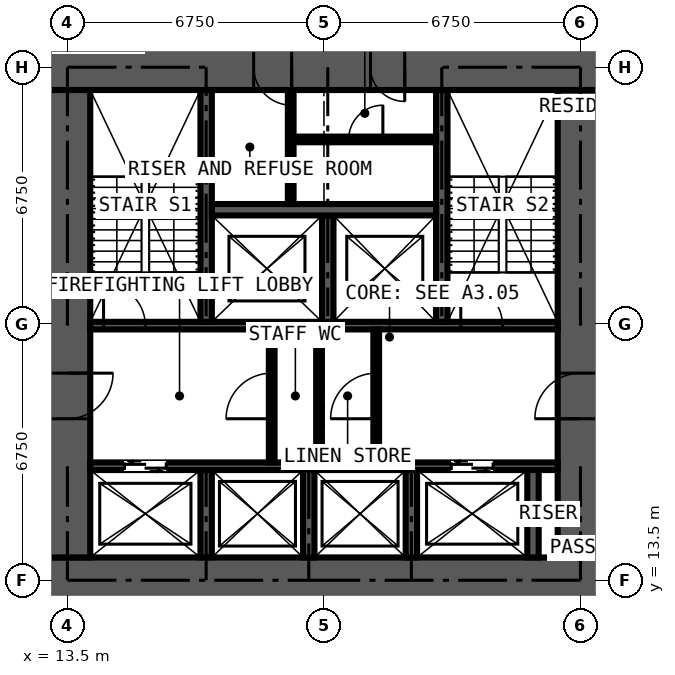
"""IFC4 building model, lengths in metres.
Left out: names, types, materials, properties, quantities, classifications, styles, units other than length and angle.
Written with IfcOpenShell. Run it as: python <this file> out.ifc"""

import sys

from ifc_helpers import new_model, si_unit, direction, frame, frame_2d, origin, place, context, subcontext, project, spatial, rectangle, extrude, element, fill, save


model = new_model("IFC4")
c1 = context("Model", 3, precision=1e-05, world=origin(), true_north=direction((0.0, 1.0)))
c2 = subcontext(c1, "Body", "Model", "MODEL_VIEW")
j1 = project(units=[si_unit("LENGTHUNIT", "METRE"), si_unit("PLANEANGLEUNIT", "RADIAN")], contexts=[c1])
p1 = place(None, origin())
s1 = spatial("IfcSite", under=j1, at=p1, CompositionType="ELEMENT")
p2 = place(p1, origin())
s2 = spatial("IfcBuilding", under=s1, at=p2, CompositionType="ELEMENT")
p3 = place(p2, frame((0.0, 0.0, 134.1)))
s3 = spatial("IfcBuildingStorey", under=s2, at=p3, CompositionType="ELEMENT", Elevation=134.1)
p4 = place(p3, frame((12.9, 13.5, 0.0), z_axis=(0.0, 0.0, 1.0), x_axis=(1.0, 0.0, 0.0)))
e1 = element("IfcWall", 1, at=p4, inside=s3, PredefinedType="SHEAR", context=c2, shape_type="SweptSolid", body=[
    extrude(rectangle(XDim=14.7, YDim=1.2, at=frame_2d((7.35, 0.0))), origin(), (0.0, 0.0, 1.0), 3.6),
])
p5 = place(p3, frame((27.0, 14.1, 0.0), z_axis=(0.0, 0.0, 1.0), x_axis=(0.0, 1.0, 0.0)))
e2 = element("IfcWall", 2, at=p5, inside=s3, PredefinedType="SHEAR", context=c2, shape_type="SweptSolid", body=[
    extrude(rectangle(XDim=12.3, YDim=1.2, at=frame_2d((6.15, 0.0))), origin(), (0.0, 0.0, 1.0), 3.6),
])
p6 = place(p5, frame((3.65, 0.0, 0.0)))
e3 = element("IfcOpeningElement", 3, at=p6, cuts=e2, PredefinedType="OPENING", context=c2, shape_type="SweptSolid", body=[
    extrude(rectangle(XDim=1.2, YDim=2.2, at=frame_2d((0.6, 1.1))), frame((0.0, 0.61, 0.0), z_axis=(0.0, -1.0, 0.0), x_axis=(1.0, 0.0, 0.0)), (0.0, 0.0, 1.0), 1.22),
])
p7 = place(p3, frame((27.6, 27.0, 0.0), z_axis=(0.0, 0.0, 1.0), x_axis=(-1.0, 0.0, 0.0)))
e4 = element("IfcWall", 4, at=p7, inside=s3, PredefinedType="SHEAR", context=c2, shape_type="SweptSolid", body=[
    extrude(rectangle(XDim=14.7, YDim=1.2, at=frame_2d((7.35, 0.0))), origin(), (0.0, 0.0, 1.0), 3.6),
])
p8 = place(p7, frame((5.225, 0.0, 0.0)))
e5 = element("IfcOpeningElement", 5, at=p8, cuts=e4, PredefinedType="OPENING", context=c2, shape_type="SweptSolid", body=[
    extrude(rectangle(XDim=0.9, YDim=2.2, at=frame_2d((0.45, 1.1))), frame((0.0, 0.61, 0.0), z_axis=(0.0, -1.0, 0.0), x_axis=(1.0, 0.0, 0.0)), (0.0, 0.0, 1.0), 1.22),
])
p9 = place(p7, frame((8.2, 0.0, 0.0)))
e6 = element("IfcOpeningElement", 6, at=p9, cuts=e4, PredefinedType="OPENING", context=c2, shape_type="SweptSolid", body=[
    extrude(rectangle(XDim=1.0, YDim=2.2, at=frame_2d((0.5, 1.1))), frame((0.0, 0.61, 0.0), z_axis=(0.0, -1.0, 0.0), x_axis=(1.0, 0.0, 0.0)), (0.0, 0.0, 1.0), 1.22),
])
p10 = place(p3, frame((13.5, 26.4, 0.0), z_axis=(0.0, 0.0, 1.0), x_axis=(0.0, -1.0, 0.0)))
e7 = element("IfcWall", 7, at=p10, inside=s3, PredefinedType="SHEAR", context=c2, shape_type="SweptSolid", body=[
    extrude(rectangle(XDim=12.3, YDim=1.2, at=frame_2d((6.15, 0.0))), origin(), (0.0, 0.0, 1.0), 3.6),
])
p11 = place(p10, frame((7.45, 0.0, 0.0)))
e8 = element("IfcOpeningElement", 8, at=p11, cuts=e7, PredefinedType="OPENING", context=c2, shape_type="SweptSolid", body=[
    extrude(rectangle(XDim=1.2, YDim=2.2, at=frame_2d((0.6, 1.1))), frame((0.0, 0.61, 0.0), z_axis=(0.0, -1.0, 0.0), x_axis=(1.0, 0.0, 0.0)), (0.0, 0.0, 1.0), 1.22),
])
p12 = place(p3, frame((14.1, 16.5, 0.0), z_axis=(0.0, 0.0, 1.0), x_axis=(1.0, 0.0, 0.0)))
e9 = element("IfcWall", 9, at=p12, inside=s3, PredefinedType="SHEAR", context=c2, shape_type="SweptSolid", body=[
    extrude(rectangle(XDim=12.3, YDim=0.2, at=frame_2d((6.15, 0.0))), origin(), (0.0, 0.0, 1.0), 3.6),
])
p13 = place(p12, frame((0.9, 0.0, 0.0)))
e10 = element("IfcOpeningElement", 10, at=p13, cuts=e9, PredefinedType="OPENING", context=c2, shape_type="SweptSolid", body=[
    extrude(rectangle(XDim=1.1, YDim=2.2, at=frame_2d((0.55, 1.1))), frame((0.0, 0.11, 0.0), z_axis=(0.0, -1.0, 0.0), x_axis=(1.0, 0.0, 0.0)), (0.0, 0.0, 1.0), 0.22),
])
p14 = place(p12, frame((9.5, 0.0, 0.0)))
e11 = element("IfcOpeningElement", 11, at=p14, cuts=e9, PredefinedType="OPENING", context=c2, shape_type="SweptSolid", body=[
    extrude(rectangle(XDim=1.1, YDim=2.2, at=frame_2d((0.55, 1.1))), frame((0.0, 0.11, 0.0), z_axis=(0.0, -1.0, 0.0), x_axis=(1.0, 0.0, 0.0)), (0.0, 0.0, 1.0), 0.22),
])
p15 = place(p3, frame((14.1, 20.2, 0.0), z_axis=(0.0, 0.0, 1.0), x_axis=(1.0, 0.0, 0.0)))
e12 = element("IfcWall", 12, at=p15, inside=s3, PredefinedType="SHEAR", context=c2, shape_type="SweptSolid", body=[
    extrude(rectangle(XDim=12.3, YDim=0.2, at=frame_2d((6.15, 0.0))), origin(), (0.0, 0.0, 1.0), 3.6),
])
p16 = place(p15, frame((0.35, 0.0, 0.0)))
e13 = element("IfcOpeningElement", 13, at=p16, cuts=e12, PredefinedType="OPENING", context=c2, shape_type="SweptSolid", body=[
    extrude(rectangle(XDim=1.1, YDim=2.2, at=frame_2d((0.55, 1.1))), frame((0.0, 0.11, 0.0), z_axis=(0.0, -1.0, 0.0), x_axis=(1.0, 0.0, 0.0)), (0.0, 0.0, 1.0), 0.22),
])
p17 = place(p15, frame((9.75, 0.0, 0.0)))
e14 = element("IfcOpeningElement", 14, at=p17, cuts=e12, PredefinedType="OPENING", context=c2, shape_type="SweptSolid", body=[
    extrude(rectangle(XDim=1.1, YDim=2.2, at=frame_2d((0.55, 1.1))), frame((0.0, 0.11, 0.0), z_axis=(0.0, -1.0, 0.0), x_axis=(1.0, 0.0, 0.0)), (0.0, 0.0, 1.0), 0.22),
])
for number, where, z_axis, x_axis in (
    (15, (17.15, 20.3, 0.0), (0.0, 0.0, 1.0), (0.0, 1.0, 0.0)),
    (16, (23.35, 20.3, 0.0), (0.0, 0.0, 1.0), (0.0, 1.0, 0.0)),
):
    element("IfcWall", number, at=place(p3, frame(where, z_axis=z_axis, x_axis=x_axis)), inside=s3, PredefinedType="SHEAR", context=c2, shape_type="SweptSolid", body=[
        extrude(rectangle(XDim=6.1, YDim=0.3, at=frame_2d((3.05, 0.0))), origin(), (0.0, 0.0, 1.0), 3.6),
    ])
p18 = place(p3, frame((20.35, 20.3, 0.0), z_axis=(0.0, 0.0, 1.0), x_axis=(0.0, 1.0, 0.0)))
e17 = element("IfcWall", 17, at=p18, inside=s3, PredefinedType="SHEAR", context=c2, shape_type="SweptSolid", body=[
    extrude(rectangle(XDim=2.8, YDim=0.3, at=frame_2d((1.4, 0.0))), origin(), (0.0, 0.0, 1.0), 3.6),
])
p19 = place(p3, frame((17.3, 23.25, 0.0), z_axis=(0.0, 0.0, 1.0), x_axis=(1.0, 0.0, 0.0)))
e18 = element("IfcWall", 18, at=p19, inside=s3, PredefinedType="SHEAR", context=c2, shape_type="SweptSolid", body=[
    extrude(rectangle(XDim=5.9, YDim=0.3, at=frame_2d((2.95, 0.0))), origin(), (0.0, 0.0, 1.0), 3.6),
])
for number, where, z_axis, x_axis in (
    (19, (17.15, 14.1, 0.0), (0.0, 0.0, 1.0), (0.0, 1.0, 0.0)),
    (20, (19.85, 14.1, 0.0), (0.0, 0.0, 1.0), (0.0, 1.0, 0.0)),
    (21, (22.55, 14.1, 0.0), (0.0, 0.0, 1.0), (0.0, 1.0, 0.0)),
    (22, (25.75, 14.1, 0.0), (0.0, 0.0, 1.0), (0.0, 1.0, 0.0)),
):
    element("IfcWall", number, at=place(p3, frame(where, z_axis=z_axis, x_axis=x_axis)), inside=s3, PredefinedType="SHEAR", context=c2, shape_type="SweptSolid", body=[
        extrude(rectangle(XDim=2.3, YDim=0.3, at=frame_2d((1.15, 0.0))), origin(), (0.0, 0.0, 1.0), 3.6),
    ])
p20 = place(p3, frame((18.875, 16.6, 0.0), z_axis=(0.0, 0.0, 1.0), x_axis=(0.0, 1.0, 0.0)))
e23 = element("IfcWall", 23, at=p20, inside=s3, PredefinedType="PARTITIONING", context=c2, shape_type="SweptSolid", body=[
    extrude(rectangle(XDim=3.5, YDim=0.15, at=frame_2d((1.75, 0.0))), origin(), (0.0, 0.0, 1.0), 3.3),
])
p21 = place(p20, frame((1.15, 0.0, 0.0)))
e24 = element("IfcOpeningElement", 24, at=p21, cuts=e23, PredefinedType="OPENING", context=c2, shape_type="SweptSolid", body=[
    extrude(rectangle(XDim=1.2, YDim=2.2, at=frame_2d((0.6, 1.1))), frame((0.0, 0.085, 0.0), z_axis=(0.0, -1.0, 0.0), x_axis=(1.0, 0.0, 0.0)), (0.0, 0.0, 1.0), 0.17),
])
p22 = place(p3, frame((21.625, 16.6, 0.0), z_axis=(0.0, 0.0, 1.0), x_axis=(0.0, 1.0, 0.0)))
e25 = element("IfcWall", 25, at=p22, inside=s3, PredefinedType="PARTITIONING", context=c2, shape_type="SweptSolid", body=[
    extrude(rectangle(XDim=3.5, YDim=0.15, at=frame_2d((1.75, 0.0))), origin(), (0.0, 0.0, 1.0), 3.3),
])
p23 = place(p22, frame((1.15, 0.0, 0.0)))
e26 = element("IfcOpeningElement", 26, at=p23, cuts=e25, PredefinedType="OPENING", context=c2, shape_type="SweptSolid", body=[
    extrude(rectangle(XDim=1.2, YDim=2.2, at=frame_2d((0.6, 1.1))), frame((0.0, 0.085, 0.0), z_axis=(0.0, -1.0, 0.0), x_axis=(1.0, 0.0, 0.0)), (0.0, 0.0, 1.0), 0.17),
])
p24 = place(p3, frame((20.12, 16.6, 0.0), z_axis=(0.0, 0.0, 1.0), x_axis=(0.0, 1.0, 0.0)))
e27 = element("IfcWall", 27, at=p24, inside=s3, PredefinedType="PARTITIONING", context=c2, shape_type="SweptSolid", body=[
    extrude(rectangle(XDim=3.5, YDim=0.15, at=frame_2d((1.75, 0.0))), origin(), (0.0, 0.0, 1.0), 3.3),
])
p25 = place(p3, frame((19.375, 23.4, 0.0), z_axis=(0.0, 0.0, 1.0), x_axis=(0.0, 1.0, 0.0)))
e28 = element("IfcWall", 28, at=p25, inside=s3, PredefinedType="PARTITIONING", context=c2, shape_type="SweptSolid", body=[
    extrude(rectangle(XDim=3.0, YDim=0.15, at=frame_2d((1.5, 0.0))), origin(), (0.0, 0.0, 1.0), 3.3),
])
p26 = place(p3, frame((19.45, 25.1, 0.0), z_axis=(0.0, 0.0, 1.0), x_axis=(1.0, 0.0, 0.0)))
e29 = element("IfcWall", 29, at=p26, inside=s3, PredefinedType="PARTITIONING", context=c2, shape_type="SweptSolid", body=[
    extrude(rectangle(XDim=3.75, YDim=0.15, at=frame_2d((1.875, 0.0))), origin(), (0.0, 0.0, 1.0), 3.3),
])
p27 = place(p26, frame((1.45, 0.0, 0.0)))
e30 = element("IfcOpeningElement", 30, at=p27, cuts=e29, PredefinedType="OPENING", context=c2, shape_type="SweptSolid", body=[
    extrude(rectangle(XDim=0.9, YDim=2.2, at=frame_2d((0.45, 1.1))), frame((0.0, 0.085, 0.0), z_axis=(0.0, -1.0, 0.0), x_axis=(1.0, 0.0, 0.0)), (0.0, 0.0, 1.0), 0.17),
])
p28 = place(p13, origin())
e31 = element("IfcDoor", 31, at=p28, inside=s3, OperationType="DOUBLE_DOOR_SLIDING", PredefinedType="DOOR", context=c2, shape_type="SweptSolid", body=[
    extrude(rectangle(XDim=1.1, YDim=2.2, at=frame_2d((0.55, 1.1))), frame((0.0, 0.025, 0.0), z_axis=(0.0, -1.0, 0.0), x_axis=(1.0, 0.0, 0.0)), (0.0, 0.0, 1.0), 0.05),
])
fill(e10, e31)
p29 = place(p14, origin())
e32 = element("IfcDoor", 32, at=p29, inside=s3, OperationType="DOUBLE_DOOR_SLIDING", PredefinedType="DOOR", context=c2, shape_type="SweptSolid", body=[
    extrude(rectangle(XDim=1.1, YDim=2.2, at=frame_2d((0.55, 1.1))), frame((0.0, 0.025, 0.0), z_axis=(0.0, -1.0, 0.0), x_axis=(1.0, 0.0, 0.0)), (0.0, 0.0, 1.0), 0.05),
])
fill(e11, e32)
p30 = place(p11, origin())
e33 = element("IfcDoor", 33, at=p30, inside=s3, OperationType="DOUBLE_DOOR_SINGLE_SWING", PredefinedType="DOOR", context=c2, shape_type="SweptSolid", body=[
    extrude(rectangle(XDim=1.2, YDim=2.2, at=frame_2d((0.6, 1.1))), frame((0.0, 0.025, 0.0), z_axis=(0.0, -1.0, 0.0), x_axis=(1.0, 0.0, 0.0)), (0.0, 0.0, 1.0), 0.05),
])
fill(e8, e33)
p31 = place(p6, origin())
e34 = element("IfcDoor", 34, at=p31, inside=s3, OperationType="DOUBLE_DOOR_SINGLE_SWING", PredefinedType="DOOR", context=c2, shape_type="SweptSolid", body=[
    extrude(rectangle(XDim=1.2, YDim=2.2, at=frame_2d((0.6, 1.1))), frame((0.0, 0.025, 0.0), z_axis=(0.0, -1.0, 0.0), x_axis=(1.0, 0.0, 0.0)), (0.0, 0.0, 1.0), 0.05),
])
fill(e3, e34)
p32 = place(p21, origin())
e35 = element("IfcDoor", 35, at=p32, inside=s3, OperationType="DOUBLE_DOOR_SINGLE_SWING", PredefinedType="DOOR", context=c2, shape_type="SweptSolid", body=[
    extrude(rectangle(XDim=1.2, YDim=2.2, at=frame_2d((0.6, 1.1))), frame((0.0, 0.025, 0.0), z_axis=(0.0, -1.0, 0.0), x_axis=(1.0, 0.0, 0.0)), (0.0, 0.0, 1.0), 0.05),
])
fill(e24, e35)
p33 = place(p23, origin())
e36 = element("IfcDoor", 36, at=p33, inside=s3, OperationType="DOUBLE_DOOR_SINGLE_SWING", PredefinedType="DOOR", context=c2, shape_type="SweptSolid", body=[
    extrude(rectangle(XDim=1.2, YDim=2.2, at=frame_2d((0.6, 1.1))), frame((0.0, 0.025, 0.0), z_axis=(0.0, -1.0, 0.0), x_axis=(1.0, 0.0, 0.0)), (0.0, 0.0, 1.0), 0.05),
])
fill(e26, e36)
p34 = place(p27, origin())
e37 = element("IfcDoor", 37, at=p34, inside=s3, OperationType="SINGLE_SWING_RIGHT", PredefinedType="DOOR", context=c2, shape_type="SweptSolid", body=[
    extrude(rectangle(XDim=0.9, YDim=2.2, at=frame_2d((0.45, 1.1))), frame((0.0, 0.025, 0.0), z_axis=(0.0, -1.0, 0.0), x_axis=(1.0, 0.0, 0.0)), (0.0, 0.0, 1.0), 0.05),
])
fill(e30, e37)
p35 = place(p8, origin())
e38 = element("IfcDoor", 38, at=p35, inside=s3, OperationType="SINGLE_SWING_LEFT", PredefinedType="DOOR", context=c2, shape_type="SweptSolid", body=[
    extrude(rectangle(XDim=0.9, YDim=2.2, at=frame_2d((0.45, 1.1))), frame((0.0, 0.4, 0.0), z_axis=(0.0, -1.0, 0.0), x_axis=(1.0, 0.0, 0.0)), (0.0, 0.0, 1.0), 0.8),
])
fill(e5, e38)
p36 = place(p9, origin())
e39 = element("IfcDoor", 39, at=p36, inside=s3, OperationType="SINGLE_SWING_LEFT", PredefinedType="DOOR", context=c2, shape_type="SweptSolid", body=[
    extrude(rectangle(XDim=1.0, YDim=2.2, at=frame_2d((0.5, 1.1))), frame((0.0, 0.025, 0.0), z_axis=(0.0, -1.0, 0.0), x_axis=(1.0, 0.0, 0.0)), (0.0, 0.0, 1.0), 0.05),
])
fill(e6, e39)
p37 = place(p16, origin())
e40 = element("IfcDoor", 40, at=p37, inside=s3, OperationType="SINGLE_SWING_LEFT", PredefinedType="DOOR", context=c2, shape_type="SweptSolid", body=[
    extrude(rectangle(XDim=1.1, YDim=2.2, at=frame_2d((0.55, 1.1))), frame((0.0, 0.025, 0.0), z_axis=(0.0, -1.0, 0.0), x_axis=(1.0, 0.0, 0.0)), (0.0, 0.0, 1.0), 0.05),
])
fill(e13, e40)
p38 = place(p17, origin())
e41 = element("IfcDoor", 41, at=p38, inside=s3, OperationType="SINGLE_SWING_LEFT", PredefinedType="DOOR", context=c2, shape_type="SweptSolid", body=[
    extrude(rectangle(XDim=1.1, YDim=2.2, at=frame_2d((0.55, 1.1))), frame((0.0, 0.025, 0.0), z_axis=(0.0, -1.0, 0.0), x_axis=(1.0, 0.0, 0.0)), (0.0, 0.0, 1.0), 0.05),
])
fill(e14, e41)
save(model, sys.argv[1])
